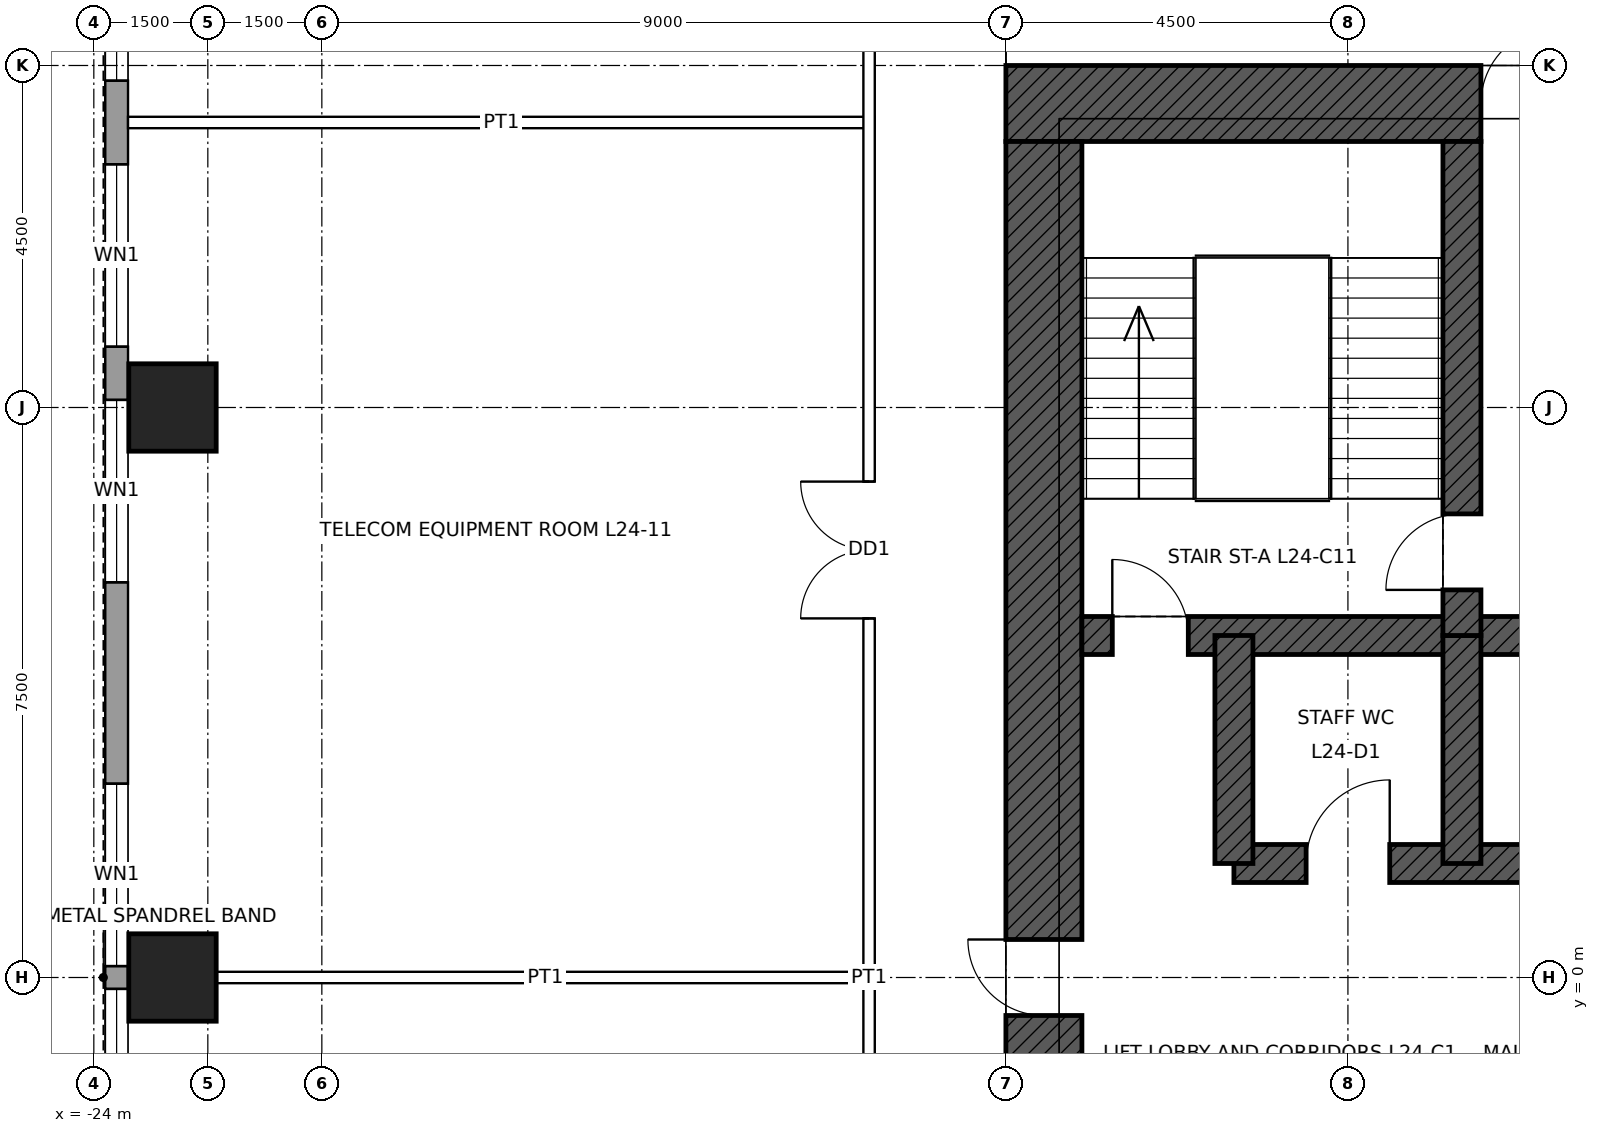
"""IFC4 building model, lengths in metres.
Left out: names, types, materials, properties, quantities, classifications, styles, units other than length and angle.
Written with IfcOpenShell. Run it as: python <this file> out.ifc"""

import sys

from ifc_helpers import new_model, si_unit, direction, frame, frame_2d, origin, origin_2d, place, context, subcontext, project, spatial, rectangle, hollow_rectangle, extrude, element, fill, save


model = new_model("IFC4")
c1 = context("Model", 3, precision=1e-05, world=origin(), true_north=direction((0.0, 1.0)))
c2 = subcontext(c1, "Body", "Model", "MODEL_VIEW")
j1 = project(units=[si_unit("LENGTHUNIT", "METRE"), si_unit("PLANEANGLEUNIT", "RADIAN")], contexts=[c1])
p1 = place(None, origin())
s1 = spatial("IfcSite", under=j1, at=p1, CompositionType="ELEMENT")
p2 = place(p1, origin())
s2 = spatial("IfcBuilding", under=s1, at=p2, CompositionType="ELEMENT")
p3 = place(p2, frame((0.0, 0.0, 122.4)))
s3 = spatial("IfcBuildingStorey", under=s2, at=p3, CompositionType="ELEMENT", Elevation=122.4)
for number, where, z_axis, x_axis in (
    (1, (-22.965, 0.0, 0.0), (0.0, 0.0, 1.0), (1.0, 0.0, 0.0)),
    (2, (-22.965, 7.5, 0.0), (0.0, 0.0, 1.0), (1.0, 0.0, 0.0)),
):
    element("IfcColumn", number, at=place(p3, frame(where, z_axis=z_axis, x_axis=x_axis)), inside=s3, PredefinedType="COLUMN", context=c2, shape_type="SweptSolid", body=[
        extrude(hollow_rectangle(XDim=1.15, YDim=1.15, WallThickness=0.075, at=origin_2d()), origin(), (0.0, 0.0, 1.0), 4.5),
    ])
p4 = place(p3, frame((-12.0, 11.5, 0.0), z_axis=(0.0, 0.0, 1.0), x_axis=(1.0, 0.0, 0.0)))
e3 = element("IfcWall", 3, at=p4, inside=s3, PredefinedType="SHEAR", context=c2, shape_type="SweptSolid", body=[
    extrude(rectangle(XDim=24.0, YDim=1.0, at=frame_2d((12.0, 0.0))), origin(), (0.0, 0.0, 1.0), 4.5),
])
p5 = place(p4, frame((6.25, 0.0, 0.0)))
e4 = element("IfcOpeningElement", 4, at=p5, cuts=e3, PredefinedType="OPENING", context=c2, shape_type="SweptSolid", body=[
    extrude(rectangle(XDim=1.0, YDim=2.4, at=frame_2d((0.5, 1.2))), frame((0.0, 0.51, 0.0), z_axis=(0.0, -1.0, 0.0), x_axis=(1.0, 0.0, 0.0)), (0.0, 0.0, 1.0), 1.02),
])
p6 = place(p4, frame((16.75, 0.0, 0.0)))
e5 = element("IfcOpeningElement", 5, at=p6, cuts=e3, PredefinedType="OPENING", context=c2, shape_type="SweptSolid", body=[
    extrude(rectangle(XDim=1.0, YDim=2.4, at=frame_2d((0.5, 1.2))), frame((0.0, 0.51, 0.0), z_axis=(0.0, -1.0, 0.0), x_axis=(1.0, 0.0, 0.0)), (0.0, 0.0, 1.0), 1.02),
])
p7 = place(p3, frame((-11.5, -11.0, 0.0), z_axis=(0.0, 0.0, 1.0), x_axis=(0.0, 1.0, 0.0)))
e6 = element("IfcWall", 6, at=p7, inside=s3, PredefinedType="SHEAR", context=c2, shape_type="SweptSolid", body=[
    extrude(rectangle(XDim=22.0, YDim=1.0, at=frame_2d((11.0, 0.0))), origin(), (0.0, 0.0, 1.0), 4.5),
])
p8 = place(p7, frame((10.5, 0.0, 0.0)))
e7 = element("IfcOpeningElement", 7, at=p8, cuts=e6, PredefinedType="OPENING", context=c2, shape_type="SweptSolid", body=[
    extrude(rectangle(XDim=1.0, YDim=2.4, at=frame_2d((0.5, 1.2))), frame((0.0, 0.51, 0.0), z_axis=(0.0, -1.0, 0.0), x_axis=(1.0, 0.0, 0.0)), (0.0, 0.0, 1.0), 1.02),
])
p9 = place(p3, frame((-11.0, 4.5, 0.0), z_axis=(0.0, 0.0, 1.0), x_axis=(1.0, 0.0, 0.0)))
e8 = element("IfcWall", 8, at=p9, inside=s3, PredefinedType="SHEAR", context=c2, shape_type="SweptSolid", body=[
    extrude(rectangle(XDim=22.0, YDim=0.5, at=frame_2d((11.0, 0.0))), origin(), (0.0, 0.0, 1.0), 4.5),
])
p10 = place(p9, frame((0.4, 0.0, 0.0)))
e9 = element("IfcOpeningElement", 9, at=p10, cuts=e8, PredefinedType="OPENING", context=c2, shape_type="SweptSolid", body=[
    extrude(rectangle(XDim=1.0, YDim=2.1, at=frame_2d((0.5, 1.05))), frame((0.0, 0.26, 0.0), z_axis=(0.0, -1.0, 0.0), x_axis=(1.0, 0.0, 0.0)), (0.0, 0.0, 1.0), 0.52),
])
p11 = place(p9, frame((20.6, 0.0, 0.0)))
e10 = element("IfcOpeningElement", 10, at=p11, cuts=e8, PredefinedType="OPENING", context=c2, shape_type="SweptSolid", body=[
    extrude(rectangle(XDim=1.0, YDim=2.1, at=frame_2d((0.5, 1.05))), frame((0.0, 0.26, 0.0), z_axis=(0.0, -1.0, 0.0), x_axis=(1.0, 0.0, 0.0)), (0.0, 0.0, 1.0), 0.52),
])
p12 = place(p3, frame((-9.0, 1.5, 0.0), z_axis=(0.0, 0.0, 1.0), x_axis=(1.0, 0.0, 0.0)))
e11 = element("IfcWall", 11, at=p12, inside=s3, PredefinedType="SHEAR", context=c2, shape_type="SweptSolid", body=[
    extrude(rectangle(XDim=18.0, YDim=0.5, at=frame_2d((9.0, 0.0))), origin(), (0.0, 0.0, 1.0), 4.5),
])
p13 = place(p12, frame((9.95, 0.0, 0.0)))
e12 = element("IfcOpeningElement", 12, at=p13, cuts=e11, PredefinedType="OPENING", context=c2, shape_type="SweptSolid", body=[
    extrude(rectangle(XDim=1.1, YDim=2.1, at=frame_2d((0.55, 1.05))), frame((0.0, 0.26, 0.0), z_axis=(0.0, -1.0, 0.0), x_axis=(1.0, 0.0, 0.0)), (0.0, 0.0, 1.0), 0.52),
])
p14 = place(p12, frame((12.95, 0.0, 0.0)))
e13 = element("IfcOpeningElement", 13, at=p14, cuts=e11, PredefinedType="OPENING", context=c2, shape_type="SweptSolid", body=[
    extrude(rectangle(XDim=1.1, YDim=2.1, at=frame_2d((0.55, 1.05))), frame((0.0, 0.26, 0.0), z_axis=(0.0, -1.0, 0.0), x_axis=(1.0, 0.0, 0.0)), (0.0, 0.0, 1.0), 0.52),
])
p15 = place(p12, frame((15.95, 0.0, 0.0)))
e14 = element("IfcOpeningElement", 14, at=p15, cuts=e11, PredefinedType="OPENING", context=c2, shape_type="SweptSolid", body=[
    extrude(rectangle(XDim=1.1, YDim=2.1, at=frame_2d((0.55, 1.05))), frame((0.0, 0.26, 0.0), z_axis=(0.0, -1.0, 0.0), x_axis=(1.0, 0.0, 0.0)), (0.0, 0.0, 1.0), 0.52),
])
p16 = place(p12, frame((0.95, 0.0, 0.0)))
e15 = element("IfcOpeningElement", 15, at=p16, cuts=e11, PredefinedType="OPENING", context=c2, shape_type="SweptSolid", body=[
    extrude(rectangle(XDim=1.1, YDim=2.1, at=frame_2d((0.55, 1.05))), frame((0.0, 0.26, 0.0), z_axis=(0.0, -1.0, 0.0), x_axis=(1.0, 0.0, 0.0)), (0.0, 0.0, 1.0), 0.52),
])
p17 = place(p12, frame((3.95, 0.0, 0.0)))
e16 = element("IfcOpeningElement", 16, at=p17, cuts=e11, PredefinedType="OPENING", context=c2, shape_type="SweptSolid", body=[
    extrude(rectangle(XDim=1.1, YDim=2.1, at=frame_2d((0.55, 1.05))), frame((0.0, 0.26, 0.0), z_axis=(0.0, -1.0, 0.0), x_axis=(1.0, 0.0, 0.0)), (0.0, 0.0, 1.0), 0.52),
])
p18 = place(p12, frame((6.95, 0.0, 0.0)))
e17 = element("IfcOpeningElement", 17, at=p18, cuts=e11, PredefinedType="OPENING", context=c2, shape_type="SweptSolid", body=[
    extrude(rectangle(XDim=1.1, YDim=2.1, at=frame_2d((0.55, 1.05))), frame((0.0, 0.26, 0.0), z_axis=(0.0, -1.0, 0.0), x_axis=(1.0, 0.0, 0.0)), (0.0, 0.0, 1.0), 0.52),
])
for number, where, z_axis, x_axis in (
    (18, (-9.0, 1.5, 0.0), (0.0, 0.0, 1.0), (0.0, 1.0, 0.0)),
    (19, (-6.0, 1.5, 0.0), (0.0, 0.0, 1.0), (0.0, 1.0, 0.0)),
):
    element("IfcWall", number, at=place(p3, frame(where, z_axis=z_axis, x_axis=x_axis)), inside=s3, PredefinedType="SHEAR", context=c2, shape_type="SweptSolid", body=[
        extrude(rectangle(XDim=3.0, YDim=0.5, at=frame_2d((1.5, 0.0))), origin(), (0.0, 0.0, 1.0), 4.5),
    ])
p19 = place(p3, frame((-6.0, 4.5, 0.0), z_axis=(0.0, 0.0, 1.0), x_axis=(0.0, 1.0, 0.0)))
e20 = element("IfcWall", 20, at=p19, inside=s3, PredefinedType="SHEAR", context=c2, shape_type="SweptSolid", body=[
    extrude(rectangle(XDim=6.5, YDim=0.5, at=frame_2d((3.25, 0.0))), origin(), (0.0, 0.0, 1.0), 4.5),
])
p20 = place(p19, frame((0.6, 0.0, 0.0)))
e21 = element("IfcOpeningElement", 21, at=p20, cuts=e20, PredefinedType="OPENING", context=c2, shape_type="SweptSolid", body=[
    extrude(rectangle(XDim=1.0, YDim=2.1, at=frame_2d((0.5, 1.05))), frame((0.0, 0.26, 0.0), z_axis=(0.0, -1.0, 0.0), x_axis=(1.0, 0.0, 0.0)), (0.0, 0.0, 1.0), 0.52),
])
p21 = place(p3, frame((-23.7, -16.2, 0.0), z_axis=(0.0, 0.0, 1.0), x_axis=(0.0, 1.0, 0.0)))
e22 = element("IfcWall", 22, at=p21, inside=s3, PredefinedType="SOLIDWALL", context=c2, shape_type="SweptSolid", body=[
    extrude(rectangle(XDim=32.4, YDim=0.3, at=frame_2d((16.2, 0.0))), origin(), (0.0, 0.0, 1.0), 4.3),
])
p22 = place(p21, frame((2.0, 0.0, 1.0)))
e23 = element("IfcOpeningElement", 23, at=p22, cuts=e22, PredefinedType="OPENING", context=c2, shape_type="SweptSolid", body=[
    extrude(rectangle(XDim=2.4, YDim=1.2, at=frame_2d((1.2, 0.6))), frame((0.0, 0.16, 0.0), z_axis=(0.0, -1.0, 0.0), x_axis=(1.0, 0.0, 0.0)), (0.0, 0.0, 1.0), 0.32),
])
p23 = place(p21, frame((5.5, 0.0, 1.0)))
e24 = element("IfcOpeningElement", 24, at=p23, cuts=e22, PredefinedType="OPENING", context=c2, shape_type="SweptSolid", body=[
    extrude(rectangle(XDim=2.4, YDim=1.2, at=frame_2d((1.2, 0.6))), frame((0.0, 0.16, 0.0), z_axis=(0.0, -1.0, 0.0), x_axis=(1.0, 0.0, 0.0)), (0.0, 0.0, 1.0), 0.32),
])
p24 = place(p21, frame((8.6, 0.0, 1.0)))
e25 = element("IfcOpeningElement", 25, at=p24, cuts=e22, PredefinedType="OPENING", context=c2, shape_type="SweptSolid", body=[
    extrude(rectangle(XDim=2.4, YDim=1.2, at=frame_2d((1.2, 0.6))), frame((0.0, 0.16, 0.0), z_axis=(0.0, -1.0, 0.0), x_axis=(1.0, 0.0, 0.0)), (0.0, 0.0, 1.0), 0.32),
])
p25 = place(p21, frame((13.65, 0.0, 1.0)))
e26 = element("IfcOpeningElement", 26, at=p25, cuts=e22, PredefinedType="OPENING", context=c2, shape_type="SweptSolid", body=[
    extrude(rectangle(XDim=2.4, YDim=1.2, at=frame_2d((1.2, 0.6))), frame((0.0, 0.16, 0.0), z_axis=(0.0, -1.0, 0.0), x_axis=(1.0, 0.0, 0.0)), (0.0, 0.0, 1.0), 0.32),
])
p26 = place(p21, frame((16.35, 0.0, 1.0)))
e27 = element("IfcOpeningElement", 27, at=p26, cuts=e22, PredefinedType="OPENING", context=c2, shape_type="SweptSolid", body=[
    extrude(rectangle(XDim=2.4, YDim=1.2, at=frame_2d((1.2, 0.6))), frame((0.0, 0.16, 0.0), z_axis=(0.0, -1.0, 0.0), x_axis=(1.0, 0.0, 0.0)), (0.0, 0.0, 1.0), 0.32),
])
p27 = place(p21, frame((21.4, 0.0, 1.0)))
e28 = element("IfcOpeningElement", 28, at=p27, cuts=e22, PredefinedType="OPENING", context=c2, shape_type="SweptSolid", body=[
    extrude(rectangle(XDim=2.4, YDim=1.2, at=frame_2d((1.2, 0.6))), frame((0.0, 0.16, 0.0), z_axis=(0.0, -1.0, 0.0), x_axis=(1.0, 0.0, 0.0)), (0.0, 0.0, 1.0), 0.32),
])
p28 = place(p21, frame((24.5, 0.0, 1.0)))
e29 = element("IfcOpeningElement", 29, at=p28, cuts=e22, PredefinedType="OPENING", context=c2, shape_type="SweptSolid", body=[
    extrude(rectangle(XDim=2.4, YDim=1.2, at=frame_2d((1.2, 0.6))), frame((0.0, 0.16, 0.0), z_axis=(0.0, -1.0, 0.0), x_axis=(1.0, 0.0, 0.0)), (0.0, 0.0, 1.0), 0.32),
])
p29 = place(p21, frame((28.0, 0.0, 1.0)))
e30 = element("IfcOpeningElement", 30, at=p29, cuts=e22, PredefinedType="OPENING", context=c2, shape_type="SweptSolid", body=[
    extrude(rectangle(XDim=2.4, YDim=1.2, at=frame_2d((1.2, 0.6))), frame((0.0, 0.16, 0.0), z_axis=(0.0, -1.0, 0.0), x_axis=(1.0, 0.0, 0.0)), (0.0, 0.0, 1.0), 0.32),
])
p30 = place(p3, frame((-22.39, 0.0, 0.0), z_axis=(0.0, 0.0, 1.0), x_axis=(1.0, 0.0, 0.0)))
e31 = element("IfcWall", 31, at=p30, inside=s3, PredefinedType="PARTITIONING", context=c2, shape_type="SweptSolid", body=[
    extrude(rectangle(XDim=8.665, YDim=0.15, at=frame_2d((4.333, 0.0))), origin(), (0.0, 0.0, 1.0), 3.431),
])
p31 = place(p3, frame((-23.55, 11.25, 0.0), z_axis=(0.0, 0.0, 1.0), x_axis=(1.0, 0.0, 0.0)))
e32 = element("IfcWall", 32, at=p31, inside=s3, PredefinedType="PARTITIONING", context=c2, shape_type="SweptSolid", body=[
    extrude(rectangle(XDim=9.825, YDim=0.15, at=frame_2d((4.913, 0.0))), origin(), (0.0, 0.0, 1.0), 3.431),
])
p32 = place(p3, frame((-13.8, -13.875, 0.0), z_axis=(0.0, 0.0, 1.0), x_axis=(0.0, 1.0, 0.0)))
e33 = element("IfcWall", 33, at=p32, inside=s3, PredefinedType="PARTITIONING", context=c2, shape_type="SweptSolid", body=[
    extrude(rectangle(XDim=27.75, YDim=0.15, at=frame_2d((13.875, 0.0))), origin(), (0.0, 0.0, 1.0), 4.3),
])
p33 = place(p32, frame((7.75, 0.0, 0.0)))
e34 = element("IfcOpeningElement", 34, at=p33, cuts=e33, PredefinedType="OPENING", context=c2, shape_type="SweptSolid", body=[
    extrude(rectangle(XDim=1.0, YDim=2.1, at=frame_2d((0.5, 1.05))), frame((0.0, 0.085, 0.0), z_axis=(0.0, -1.0, 0.0), x_axis=(1.0, 0.0, 0.0)), (0.0, 0.0, 1.0), 0.17),
])
p34 = place(p32, frame((18.6, 0.0, 0.0)))
e35 = element("IfcOpeningElement", 35, at=p34, cuts=e33, PredefinedType="OPENING", context=c2, shape_type="SweptSolid", body=[
    extrude(rectangle(XDim=1.8, YDim=2.4, at=frame_2d((0.9, 1.2))), frame((0.0, 0.085, 0.0), z_axis=(0.0, -1.0, 0.0), x_axis=(1.0, 0.0, 0.0)), (0.0, 0.0, 1.0), 0.17),
])
p35 = place(p25, origin())
e36 = element("IfcWindow", 36, at=p35, inside=s3, PartitioningType="SINGLE_PANEL", PredefinedType="WINDOW", context=c2, shape_type="SweptSolid", body=[
    extrude(rectangle(XDim=2.4, YDim=1.2, at=frame_2d((1.2, 0.6))), frame((0.0, 0.03, 0.0), z_axis=(0.0, -1.0, 0.0), x_axis=(1.0, 0.0, 0.0)), (0.0, 0.0, 1.0), 0.06),
])
fill(e26, e36)
p36 = place(p26, origin())
e37 = element("IfcWindow", 37, at=p36, inside=s3, PartitioningType="SINGLE_PANEL", PredefinedType="WINDOW", context=c2, shape_type="SweptSolid", body=[
    extrude(rectangle(XDim=2.4, YDim=1.2, at=frame_2d((1.2, 0.6))), frame((0.0, 0.03, 0.0), z_axis=(0.0, -1.0, 0.0), x_axis=(1.0, 0.0, 0.0)), (0.0, 0.0, 1.0), 0.06),
])
fill(e27, e37)
p37 = place(p27, origin())
e38 = element("IfcWindow", 38, at=p37, inside=s3, PartitioningType="SINGLE_PANEL", PredefinedType="WINDOW", context=c2, shape_type="SweptSolid", body=[
    extrude(rectangle(XDim=2.4, YDim=1.2, at=frame_2d((1.2, 0.6))), frame((0.0, 0.03, 0.0), z_axis=(0.0, -1.0, 0.0), x_axis=(1.0, 0.0, 0.0)), (0.0, 0.0, 1.0), 0.06),
])
fill(e28, e38)
p38 = place(p28, origin())
e39 = element("IfcWindow", 39, at=p38, inside=s3, PartitioningType="SINGLE_PANEL", PredefinedType="WINDOW", context=c2, shape_type="SweptSolid", body=[
    extrude(rectangle(XDim=2.4, YDim=1.2, at=frame_2d((1.2, 0.6))), frame((0.0, 0.03, 0.0), z_axis=(0.0, -1.0, 0.0), x_axis=(1.0, 0.0, 0.0)), (0.0, 0.0, 1.0), 0.06),
])
fill(e29, e39)
p39 = place(p29, origin())
e40 = element("IfcWindow", 40, at=p39, inside=s3, PartitioningType="SINGLE_PANEL", PredefinedType="WINDOW", context=c2, shape_type="SweptSolid", body=[
    extrude(rectangle(XDim=2.4, YDim=1.2, at=frame_2d((1.2, 0.6))), frame((0.0, 0.03, 0.0), z_axis=(0.0, -1.0, 0.0), x_axis=(1.0, 0.0, 0.0)), (0.0, 0.0, 1.0), 0.06),
])
fill(e30, e40)
p40 = place(p10, origin())
e41 = element("IfcDoor", 41, at=p40, inside=s3, OperationType="SINGLE_SWING_LEFT", PredefinedType="DOOR", context=c2, shape_type="SweptSolid", body=[
    extrude(rectangle(XDim=1.0, YDim=2.1, at=frame_2d((0.5, 1.05))), frame((0.0, 0.025, 0.0), z_axis=(0.0, -1.0, 0.0), x_axis=(1.0, 0.0, 0.0)), (0.0, 0.0, 1.0), 0.05),
])
fill(e9, e41)
p41 = place(p20, origin())
e42 = element("IfcDoor", 42, at=p41, inside=s3, OperationType="SINGLE_SWING_LEFT", PredefinedType="DOOR", context=c2, shape_type="SweptSolid", body=[
    extrude(rectangle(XDim=1.0, YDim=2.1, at=frame_2d((0.5, 1.05))), frame((0.0, 0.025, 0.0), z_axis=(0.0, -1.0, 0.0), x_axis=(1.0, 0.0, 0.0)), (0.0, 0.0, 1.0), 0.05),
])
fill(e21, e42)
p42 = place(p5, origin())
e43 = element("IfcDoor", 43, at=p42, inside=s3, OperationType="SINGLE_SWING_RIGHT", PredefinedType="DOOR", context=c2, shape_type="SweptSolid", body=[
    extrude(rectangle(XDim=1.0, YDim=2.4, at=frame_2d((0.5, 1.2))), frame((0.0, 0.485, 0.0), z_axis=(0.0, -1.0, 0.0), x_axis=(1.0, 0.0, 0.0)), (0.0, 0.0, 1.0), 0.05),
])
fill(e4, e43)
p43 = place(p8, origin())
e44 = element("IfcDoor", 44, at=p43, inside=s3, OperationType="SINGLE_SWING_RIGHT", PredefinedType="DOOR", context=c2, shape_type="SweptSolid", body=[
    extrude(rectangle(XDim=1.0, YDim=2.4, at=frame_2d((0.5, 1.2))), frame((0.0, 0.485, 0.0), z_axis=(0.0, -1.0, 0.0), x_axis=(1.0, 0.0, 0.0)), (0.0, 0.0, 1.0), 0.05),
])
fill(e7, e44)
p44 = place(p16, origin())
e45 = element("IfcDoor", 45, at=p44, inside=s3, OperationType="SINGLE_SWING_RIGHT", PredefinedType="DOOR", context=c2, shape_type="SweptSolid", body=[
    extrude(rectangle(XDim=1.1, YDim=2.1, at=frame_2d((0.55, 1.05))), frame((0.0, 0.025, 0.0), z_axis=(0.0, -1.0, 0.0), x_axis=(1.0, 0.0, 0.0)), (0.0, 0.0, 1.0), 0.05),
])
fill(e15, e45)
p45 = place(p34, origin())
e46 = element("IfcDoor", 46, at=p45, inside=s3, OperationType="DOUBLE_DOOR_SINGLE_SWING", PredefinedType="DOOR", context=c2, shape_type="SweptSolid", body=[
    extrude(rectangle(XDim=1.8, YDim=2.4, at=frame_2d((0.9, 1.2))), frame((0.0, 0.025, 0.0), z_axis=(0.0, -1.0, 0.0), x_axis=(1.0, 0.0, 0.0)), (0.0, 0.0, 1.0), 0.05),
])
fill(e35, e46)
save(model, sys.argv[1])
